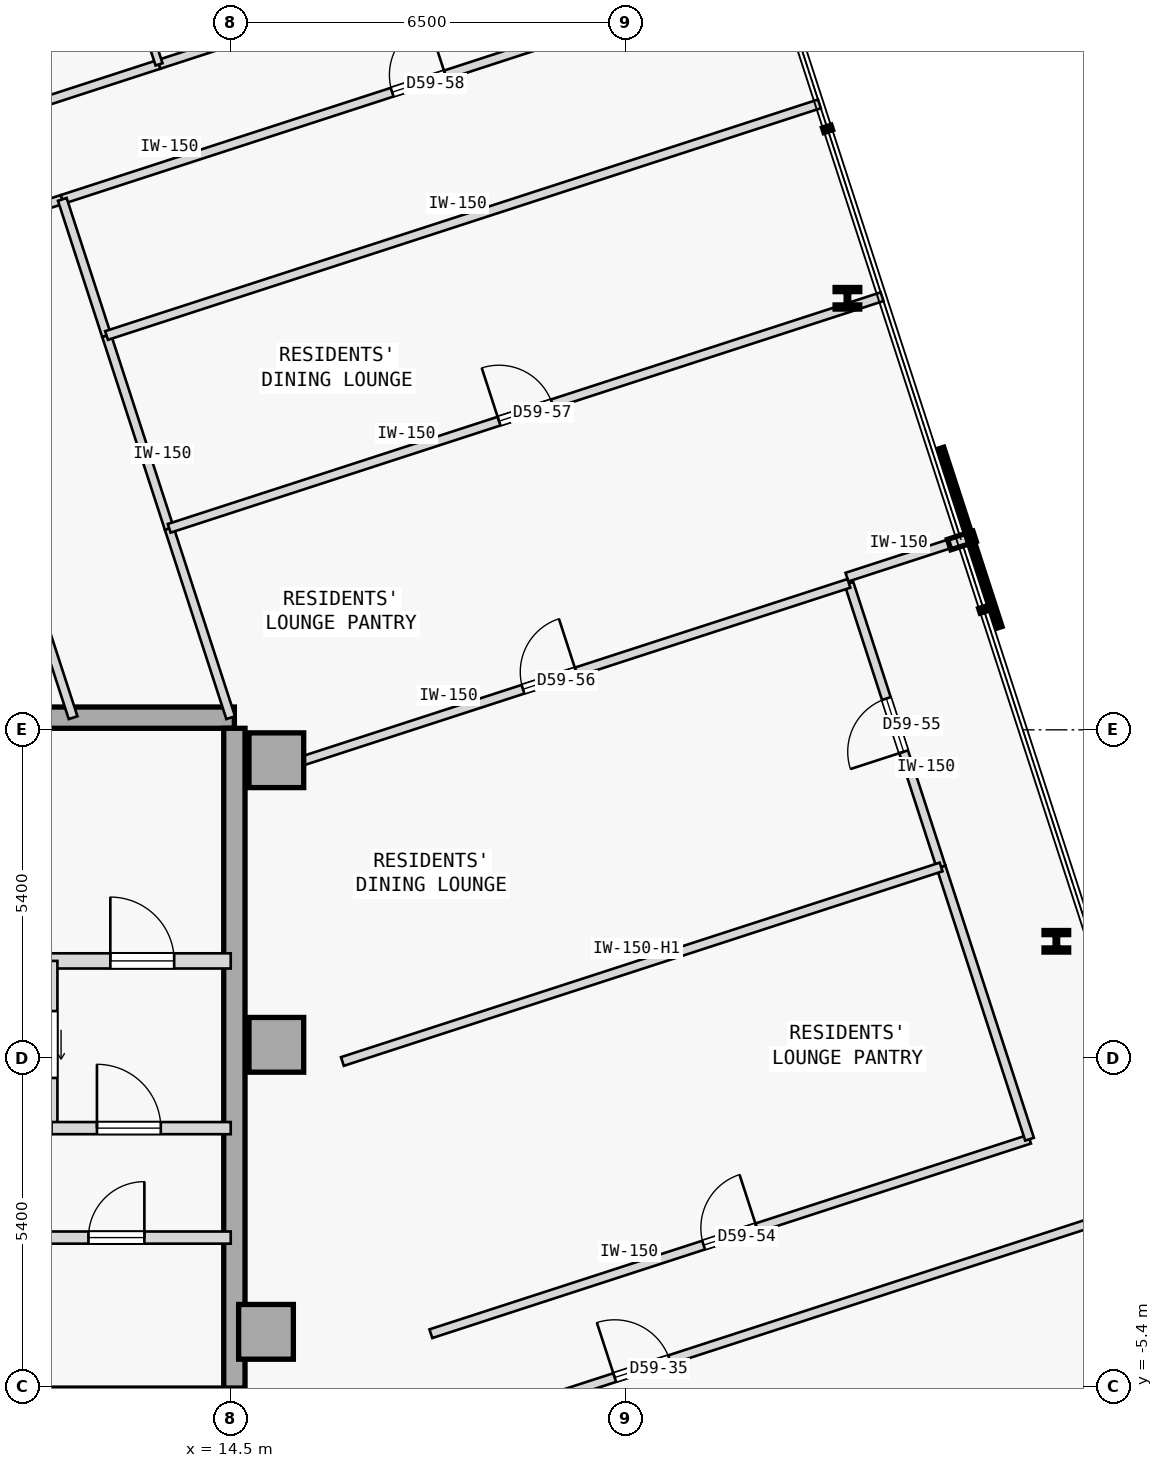
"""IFC4 building model, lengths in metres.
Left out: names, types, materials, properties, quantities, classifications, styles, units other than length and angle.
Written with IfcOpenShell. Run it as: python <this file> out.ifc"""

import sys

from ifc_helpers import new_model, si_unit, direction, frame, frame_2d, origin, origin_2d, place, context, subcontext, project, spatial, rectangle, i_section, extrude, element, fill, save


model = new_model("IFC4")
c1 = context("Model", 3, precision=1e-05, world=origin(), true_north=direction((0.0, 1.0)))
c2 = subcontext(c1, "Body", "Model", "MODEL_VIEW")
j1 = project(units=[si_unit("LENGTHUNIT", "METRE"), si_unit("PLANEANGLEUNIT", "RADIAN")], contexts=[c1])
p1 = place(None, origin())
s1 = spatial("IfcSite", under=j1, at=p1, CompositionType="ELEMENT")
p2 = place(p1, origin())
s2 = spatial("IfcBuilding", under=s1, at=p2, CompositionType="ELEMENT")
p3 = place(p2, frame((0.0, 0.0, 224.3)))
s3 = spatial("IfcBuildingStorey", under=s2, at=p3, CompositionType="ELEMENT", Elevation=224.3)
for number, where, z_axis, x_axis in (
    (1, (15.25, 4.9, 0.0), (0.0, 0.0, 1.0), (1.0, 0.0, 0.0)),
    (2, (15.25, 0.22, 0.0), (0.0, 0.0, 1.0), (1.0, 0.0, 0.0)),
    (3, (15.08, -4.5, 0.0), (0.0, 0.0, 1.0), (1.0, 0.0, 0.0)),
):
    element("IfcColumn", number, at=place(p3, frame(where, z_axis=z_axis, x_axis=x_axis)), inside=s3, PredefinedType="COLUMN", context=c2, shape_type="SweptSolid", body=[
        extrude(rectangle(XDim=0.9, YDim=0.9, at=origin_2d()), origin(), (0.0, 0.0, 1.0), 3.35),
    ])
p4 = place(p3, frame((3.15, 5.6, 0.0), z_axis=(0.0, 0.0, 1.0), x_axis=(1.0, 0.0, 0.0)))
e4 = element("IfcWall", 4, at=p4, inside=s3, PredefinedType="SHEAR", context=c2, shape_type="SweptSolid", body=[
    extrude(rectangle(XDim=11.41, YDim=0.35, at=frame_2d((5.705, 0.0))), origin(), (0.0, 0.0, 1.0), 3.125),
])
p5 = place(p3, frame((14.56, -5.425, 0.0), z_axis=(0.0, 0.0, 1.0), x_axis=(0.0, 1.0, 0.0)))
e5 = element("IfcWall", 5, at=p5, inside=s3, PredefinedType="SHEAR", context=c2, shape_type="SweptSolid", body=[
    extrude(rectangle(XDim=10.85, YDim=0.35, at=frame_2d((5.425, 0.0))), origin(), (0.0, 0.0, 1.0), 3.125),
])
for number, where, z_axis, x_axis in (
    (6, (28.078, 1.922, 0.0), (0.0, 0.0, 1.0), (1.0, 0.0, 0.0)),
    (7, (24.642, 12.497, 0.0), (0.0, 0.0, 1.0), (1.0, 0.0, 0.0)),
):
    element("IfcColumn", number, at=place(p3, frame(where, z_axis=z_axis, x_axis=x_axis)), inside=s3, PredefinedType="COLUMN", context=c2, shape_type="SweptSolid", body=[
        extrude(i_section(OverallWidth=0.405, OverallDepth=0.355, WebThickness=0.042, FlangeThickness=0.068, FilletRadius=0.015, at=origin_2d()), origin(), (0.0, 0.0, 1.0), 3.35),
    ])
p6 = place(p3, frame((10.9, 1.6, 0.0), z_axis=(0.0, 0.0, 1.0), x_axis=(1.0, 0.0, 0.0)))
e8 = element("IfcWall", 8, at=p6, inside=s3, PredefinedType="STANDARD", context=c2, shape_type="SweptSolid", body=[
    extrude(rectangle(XDim=3.6, YDim=0.25, at=frame_2d((1.8, 0.0))), origin(), (0.0, 0.0, 1.0), 3.125),
])
p7 = place(p6, frame((1.62, 0.0, 0.0)))
e9 = element("IfcOpeningElement", 9, at=p7, cuts=e8, PredefinedType="OPENING", context=c2, shape_type="SweptSolid", body=[
    extrude(rectangle(XDim=1.05, YDim=2.15, at=frame_2d((0.525, 1.075))), frame((0.0, 0.135, 0.0), z_axis=(0.0, -1.0, 0.0), x_axis=(1.0, 0.0, 0.0)), (0.0, 0.0, 1.0), 0.27),
])
p8 = place(p3, frame((11.55, -1.15, 0.0), z_axis=(0.0, 0.0, 1.0), x_axis=(0.0, 1.0, 0.0)))
e10 = element("IfcWall", 10, at=p8, inside=s3, PredefinedType="STANDARD", context=c2, shape_type="SweptSolid", body=[
    extrude(rectangle(XDim=2.75, YDim=0.2, at=frame_2d((1.375, 0.0))), origin(), (0.0, 0.0, 1.0), 3.125),
])
p9 = place(p8, frame((0.825, 0.0, 0.0)))
e11 = element("IfcOpeningElement", 11, at=p9, cuts=e10, PredefinedType="OPENING", context=c2, shape_type="SweptSolid", body=[
    extrude(rectangle(XDim=1.1, YDim=2.15, at=frame_2d((0.55, 1.075))), frame((0.0, 0.11, 0.0), z_axis=(0.0, -1.0, 0.0), x_axis=(1.0, 0.0, 0.0)), (0.0, 0.0, 1.0), 0.22),
])
p10 = place(p3, frame((11.55, -1.15, 0.0), z_axis=(0.0, 0.0, 1.0), x_axis=(1.0, 0.0, 0.0)))
e12 = element("IfcWall", 12, at=p10, inside=s3, PredefinedType="STANDARD", context=c2, shape_type="SweptSolid", body=[
    extrude(rectangle(XDim=2.95, YDim=0.2, at=frame_2d((1.475, 0.0))), origin(), (0.0, 0.0, 1.0), 3.125),
])
p11 = place(p10, frame((0.75, 0.0, 0.0)))
e13 = element("IfcOpeningElement", 13, at=p11, cuts=e12, PredefinedType="OPENING", context=c2, shape_type="SweptSolid", body=[
    extrude(rectangle(XDim=1.05, YDim=2.18, at=frame_2d((0.525, 1.09))), frame((0.0, 0.11, 0.0), z_axis=(0.0, -1.0, 0.0), x_axis=(1.0, 0.0, 0.0)), (0.0, 0.0, 1.0), 0.22),
])
p12 = place(p3, frame((3.7, -2.95, 0.0), z_axis=(0.0, 0.0, 1.0), x_axis=(1.0, 0.0, 0.0)))
e14 = element("IfcWall", 14, at=p12, inside=s3, PredefinedType="STANDARD", context=c2, shape_type="SweptSolid", body=[
    extrude(rectangle(XDim=10.8, YDim=0.2, at=frame_2d((5.4, 0.0))), origin(), (0.0, 0.0, 1.0), 3.125),
])
p13 = place(p12, frame((0.53, 0.0, 0.0)))
e15 = element("IfcOpeningElement", 15, at=p13, cuts=e14, PredefinedType="OPENING", context=c2, shape_type="SweptSolid", body=[
    extrude(rectangle(XDim=1.1, YDim=2.15, at=frame_2d((0.55, 1.075))), frame((0.0, 0.11, 0.0), z_axis=(0.0, -1.0, 0.0), x_axis=(1.0, 0.0, 0.0)), (0.0, 0.0, 1.0), 0.22),
])
p14 = place(p12, frame((4.14, 0.0, 0.0)))
e16 = element("IfcOpeningElement", 16, at=p14, cuts=e14, PredefinedType="OPENING", context=c2, shape_type="SweptSolid", body=[
    extrude(rectangle(XDim=0.92, YDim=2.15, at=frame_2d((0.46, 1.075))), frame((0.0, 0.11, 0.0), z_axis=(0.0, -1.0, 0.0), x_axis=(1.0, 0.0, 0.0)), (0.0, 0.0, 1.0), 0.22),
])
p15 = place(p12, frame((8.46, 0.0, 0.0)))
e17 = element("IfcOpeningElement", 17, at=p15, cuts=e14, PredefinedType="OPENING", context=c2, shape_type="SweptSolid", body=[
    extrude(rectangle(XDim=0.92, YDim=2.15, at=frame_2d((0.46, 1.075))), frame((0.0, 0.11, 0.0), z_axis=(0.0, -1.0, 0.0), x_axis=(1.0, 0.0, 0.0)), (0.0, 0.0, 1.0), 0.22),
])
p16 = place(p3, frame((11.086, 15.617, 0.0), z_axis=(0.0, 0.0, 1.0), x_axis=(0.951045519245, 0.309050837767, 0.0)))
e18 = element("IfcWall", 18, at=p16, inside=s3, PredefinedType="PARTITIONING", context=c2, shape_type="SweptSolid", body=[
    extrude(rectangle(XDim=2.35, YDim=0.15, at=frame_2d((1.175, 0.0))), origin(), (0.0, 0.0, 1.0), 3.125),
])
p17 = place(p3, frame((13.321, 16.344, 0.0), z_axis=(0.0, 0.0, 1.0), x_axis=(0.951052627573, 0.309028962374, 0.0)))
e19 = element("IfcWall", 19, at=p17, inside=s3, PredefinedType="PARTITIONING", context=c2, shape_type="SweptSolid", body=[
    extrude(rectangle(XDim=4.35, YDim=0.15, at=frame_2d((2.175, 0.0))), origin(), (0.0, 0.0, 1.0), 3.125),
])
p18 = place(p3, frame((12.517, -7.948, 0.0), z_axis=(0.0, 0.0, 1.0), x_axis=(0.951053764264, 0.309025464128, 0.0)))
e20 = element("IfcWall", 20, at=p18, inside=s3, PredefinedType="PARTITIONING", context=c2, shape_type="SweptSolid", body=[
    extrude(rectangle(XDim=18.399, YDim=0.15, at=frame_2d((9.2, 0.0))), origin(), (0.0, 0.0, 1.0), 3.125),
])
p19 = place(p18, frame((8.725, 0.0, 0.0)))
e21 = element("IfcOpeningElement", 21, at=p19, cuts=e20, PredefinedType="OPENING", context=c2, shape_type="SweptSolid", body=[
    extrude(rectangle(XDim=0.95, YDim=2.15, at=frame_2d((0.475, 1.075))), frame((0.0, 0.085, 0.0), z_axis=(0.0, -1.0, 0.0), x_axis=(1.0, 0.0, 0.0)), (0.0, 0.0, 1.0), 0.17),
])
p20 = place(p3, frame((9.386, 13.362, 0.0), z_axis=(0.0, 0.0, 1.0), x_axis=(0.951052991774, 0.309027841526, 0.0)))
e22 = element("IfcWall", 22, at=p20, inside=s3, PredefinedType="PARTITIONING", context=c2, shape_type="SweptSolid", body=[
    extrude(rectangle(XDim=2.465, YDim=0.15, at=frame_2d((1.232, 0.0))), origin(), (0.0, 0.0, 1.0), 3.125),
])
p21 = place(p20, frame((0.772, 0.0, 0.0)))
e23 = element("IfcOpeningElement", 23, at=p21, cuts=e22, PredefinedType="OPENING", context=c2, shape_type="SweptSolid", body=[
    extrude(rectangle(XDim=0.92, YDim=2.15, at=frame_2d((0.46, 1.075))), frame((0.0, 0.085, 0.0), z_axis=(0.0, -1.0, 0.0), x_axis=(1.0, 0.0, 0.0)), (0.0, 0.0, 1.0), 0.17),
])
p22 = place(p3, frame((17.791, -4.531, 0.0), z_axis=(0.0, 0.0, 1.0), x_axis=(0.951056769902, 0.309016213852, 0.0)))
e24 = element("IfcWall", 24, at=p22, inside=s3, PredefinedType="PARTITIONING", context=c2, shape_type="SweptSolid", body=[
    extrude(rectangle(XDim=10.352, YDim=0.15, at=frame_2d((5.176, 0.0))), origin(), (0.0, 0.0, 1.0), 3.125),
])
p23 = place(p22, frame((4.716, 0.0, 0.0)))
e25 = element("IfcOpeningElement", 25, at=p23, cuts=e24, PredefinedType="OPENING", context=c2, shape_type="SweptSolid", body=[
    extrude(rectangle(XDim=0.92, YDim=2.15, at=frame_2d((0.46, 1.075))), frame((0.0, 0.085, 0.0), z_axis=(0.0, -1.0, 0.0), x_axis=(1.0, 0.0, 0.0)), (0.0, 0.0, 1.0), 0.17),
])
p24 = place(p3, frame((27.637, -1.332, 0.0), z_axis=(0.0, 0.0, 1.0), x_axis=(-0.309029776355, 0.951052363083, 0.0)))
e26 = element("IfcWall", 26, at=p24, inside=s3, PredefinedType="PARTITIONING", context=c2, shape_type="SweptSolid", body=[
    extrude(rectangle(XDim=4.707, YDim=0.15, at=frame_2d((2.354, 0.0))), origin(), (0.0, 0.0, 1.0), 3.125),
])
p25 = place(p3, frame((26.182, 3.145, 0.0), z_axis=(0.0, 0.0, 1.0), x_axis=(-0.309019653166, 0.951055652397, 0.0)))
e27 = element("IfcWall", 27, at=p25, inside=s3, PredefinedType="PARTITIONING", context=c2, shape_type="SweptSolid", body=[
    extrude(rectangle(XDim=4.904, YDim=0.15, at=frame_2d((2.452, 0.0))), origin(), (0.0, 0.0, 1.0), 3.125),
])
p26 = place(p25, frame((1.992, 0.0, 0.0)))
e28 = element("IfcOpeningElement", 28, at=p26, cuts=e27, PredefinedType="OPENING", context=c2, shape_type="SweptSolid", body=[
    extrude(rectangle(XDim=0.92, YDim=2.15, at=frame_2d((0.46, 1.075))), frame((0.0, 0.085, 0.0), z_axis=(0.0, -1.0, 0.0), x_axis=(1.0, 0.0, 0.0)), (0.0, 0.0, 1.0), 0.17),
])
p27 = place(p3, frame((24.634, 7.91, 0.0), z_axis=(0.0, 0.0, 1.0), x_axis=(0.951054051148, 0.309024581215, 0.0)))
e29 = element("IfcWall", 29, at=p27, inside=s3, PredefinedType="PARTITIONING", context=c2, shape_type="SweptSolid", body=[
    extrude(rectangle(XDim=1.975, YDim=0.15, at=frame_2d((0.988, 0.0))), origin(), (0.0, 0.0, 1.0), 3.125),
])
p28 = place(p3, frame((11.73, 14.123, 0.0), z_axis=(0.0, 0.0, 1.0), x_axis=(0.951060263663, 0.309005460926, 0.0)))
e30 = element("IfcWall", 30, at=p28, inside=s3, PredefinedType="PARTITIONING", context=c2, shape_type="SweptSolid", body=[
    extrude(rectangle(XDim=12.327, YDim=0.15, at=frame_2d((6.164, 0.0))), origin(), (0.0, 0.0, 1.0), 3.125),
])
p29 = place(p28, frame((5.704, 0.0, 0.0)))
e31 = element("IfcOpeningElement", 31, at=p29, cuts=e30, PredefinedType="OPENING", context=c2, shape_type="SweptSolid", body=[
    extrude(rectangle(XDim=0.92, YDim=2.15, at=frame_2d((0.46, 1.075))), frame((0.0, 0.085, 0.0), z_axis=(0.0, -1.0, 0.0), x_axis=(1.0, 0.0, 0.0)), (0.0, 0.0, 1.0), 0.17),
])
p30 = place(p3, frame((13.321, 16.344, 0.0), z_axis=(0.0, 0.0, 1.0), x_axis=(-0.309058537449, 0.951043017129, 0.0)))
e32 = element("IfcWall", 32, at=p30, inside=s3, PredefinedType="PARTITIONING", context=c2, shape_type="SweptSolid", body=[
    extrude(rectangle(XDim=2.005, YDim=0.12, at=frame_2d((1.002, 0.0))), origin(), (0.0, 0.0, 1.0), 3.125),
])
p31 = place(p3, frame((11.908, 5.6, 0.0), z_axis=(0.0, 0.0, 1.0), x_axis=(-0.308994076163, 0.951063962568, 0.0)))
e33 = element("IfcWall", 33, at=p31, inside=s3, PredefinedType="PARTITIONING", context=c2, shape_type="SweptSolid", body=[
    extrude(rectangle(XDim=8.161, YDim=0.15, at=frame_2d((4.081, 0.0))), origin(), (0.0, 0.0, 1.0), 3.125),
])
p32 = place(p3, frame((14.5, 5.6, 0.0), z_axis=(0.0, 0.0, 1.0), x_axis=(-0.309015253813, 0.951057081836, 0.0)))
e34 = element("IfcWall", 34, at=p32, inside=s3, PredefinedType="PARTITIONING", context=c2, shape_type="SweptSolid", body=[
    extrude(rectangle(XDim=3.274, YDim=0.15, at=frame_2d((1.637, 0.0))), origin(), (0.0, 0.0, 1.0), 3.125),
])
p33 = place(p3, frame((13.488, 8.714, 0.0), z_axis=(0.0, 0.0, 1.0), x_axis=(-0.308946982245, 0.951079261766, 0.0)))
e35 = element("IfcWall", 35, at=p33, inside=s3, PredefinedType="PARTITIONING", context=c2, shape_type="SweptSolid", body=[
    extrude(rectangle(XDim=3.334, YDim=0.15, at=frame_2d((1.667, 0.0))), origin(), (0.0, 0.0, 1.0), 3.125),
])
p34 = place(p3, frame((12.458, 11.885, 0.0), z_axis=(0.0, 0.0, 1.0), x_axis=(-0.309062621189, 0.951041690035, 0.0)))
e36 = element("IfcWall", 36, at=p34, inside=s3, PredefinedType="PARTITIONING", context=c2, shape_type="SweptSolid", body=[
    extrude(rectangle(XDim=2.354, YDim=0.15, at=frame_2d((1.177, 0.0))), origin(), (0.0, 0.0, 1.0), 3.125),
])
p35 = place(p3, frame((16.337, -0.054, 0.0), z_axis=(0.0, 0.0, 1.0), x_axis=(0.951056769902, 0.309016213852, 0.0)))
e37 = element("IfcWall", 37, at=p35, inside=s3, PredefinedType="PARTITIONING", context=c2, shape_type="SweptSolid", body=[
    extrude(rectangle(XDim=10.352, YDim=0.15, at=frame_2d((5.176, 0.0))), origin(), (0.0, 0.0, 1.0), 2.675),
])
p36 = place(p3, frame((14.821, 4.61, 0.0), z_axis=(0.0, 0.0, 1.0), x_axis=(0.951063700751, 0.30899488202, 0.0)))
e38 = element("IfcWall", 38, at=p36, inside=s3, PredefinedType="PARTITIONING", context=c2, shape_type="SweptSolid", body=[
    extrude(rectangle(XDim=10.352, YDim=0.15, at=frame_2d((5.176, 0.0))), origin(), (0.0, 0.0, 1.0), 3.125),
])
p37 = place(p36, frame((4.716, 0.0, 0.0)))
e39 = element("IfcOpeningElement", 39, at=p37, cuts=e38, PredefinedType="OPENING", context=c2, shape_type="SweptSolid", body=[
    extrude(rectangle(XDim=0.92, YDim=2.15, at=frame_2d((0.46, 1.075))), frame((0.0, 0.085, 0.0), z_axis=(0.0, -1.0, 0.0), x_axis=(1.0, 0.0, 0.0)), (0.0, 0.0, 1.0), 0.17),
])
p38 = place(p3, frame((13.488, 8.714, 0.0), z_axis=(0.0, 0.0, 1.0), x_axis=(0.951062154725, 0.308999640533, 0.0)))
e40 = element("IfcWall", 40, at=p38, inside=s3, PredefinedType="PARTITIONING", context=c2, shape_type="SweptSolid", body=[
    extrude(rectangle(XDim=12.327, YDim=0.15, at=frame_2d((6.164, 0.0))), origin(), (0.0, 0.0, 1.0), 3.125),
])
p39 = place(p38, frame((5.704, 0.0, 0.0)))
e41 = element("IfcOpeningElement", 41, at=p39, cuts=e40, PredefinedType="OPENING", context=c2, shape_type="SweptSolid", body=[
    extrude(rectangle(XDim=0.92, YDim=2.15, at=frame_2d((0.46, 1.075))), frame((0.0, 0.085, 0.0), z_axis=(0.0, -1.0, 0.0), x_axis=(1.0, 0.0, 0.0)), (0.0, 0.0, 1.0), 0.17),
])
p40 = place(p3, frame((12.458, 11.885, 0.0), z_axis=(0.0, 0.0, 1.0), x_axis=(0.951060263663, 0.309005460926, 0.0)))
e42 = element("IfcWall", 42, at=p40, inside=s3, PredefinedType="PARTITIONING", context=c2, shape_type="SweptSolid", body=[
    extrude(rectangle(XDim=12.327, YDim=0.15, at=frame_2d((6.164, 0.0))), origin(), (0.0, 0.0, 1.0), 3.125),
])
p41 = place(p7, origin())
e43 = element("IfcDoor", 43, at=p41, inside=s3, OperationType="SINGLE_SWING_LEFT", PredefinedType="DOOR", context=c2, shape_type="SweptSolid", body=[
    extrude(rectangle(XDim=1.05, YDim=2.15, at=frame_2d((0.525, 1.075))), frame((0.0, 0.025, 0.0), z_axis=(0.0, -1.0, 0.0), x_axis=(1.0, 0.0, 0.0)), (0.0, 0.0, 1.0), 0.05),
])
fill(e9, e43)
p42 = place(p11, origin())
e44 = element("IfcDoor", 44, at=p42, inside=s3, OperationType="SINGLE_SWING_LEFT", PredefinedType="DOOR", context=c2, shape_type="SweptSolid", body=[
    extrude(rectangle(XDim=1.05, YDim=2.18, at=frame_2d((0.525, 1.09))), frame((0.0, 0.025, 0.0), z_axis=(0.0, -1.0, 0.0), x_axis=(1.0, 0.0, 0.0)), (0.0, 0.0, 1.0), 0.05),
])
fill(e13, e44)
p43 = place(p9, origin())
e45 = element("IfcDoor", 45, at=p43, inside=s3, OperationType="SLIDING_TO_RIGHT", PredefinedType="DOOR", context=c2, shape_type="SweptSolid", body=[
    extrude(rectangle(XDim=1.1, YDim=2.15, at=frame_2d((0.55, 1.075))), frame((0.0, 0.025, 0.0), z_axis=(0.0, -1.0, 0.0), x_axis=(1.0, 0.0, 0.0)), (0.0, 0.0, 1.0), 0.05),
])
fill(e11, e45)
p44 = place(p15, origin())
e46 = element("IfcDoor", 46, at=p44, inside=s3, OperationType="SINGLE_SWING_RIGHT", PredefinedType="DOOR", context=c2, shape_type="SweptSolid", body=[
    extrude(rectangle(XDim=0.92, YDim=2.15, at=frame_2d((0.46, 1.075))), frame((0.0, 0.025, 0.0), z_axis=(0.0, -1.0, 0.0), x_axis=(1.0, 0.0, 0.0)), (0.0, 0.0, 1.0), 0.05),
])
fill(e17, e46)
p45 = place(p19, origin())
e47 = element("IfcDoor", 47, at=p45, inside=s3, OperationType="SINGLE_SWING_LEFT", PredefinedType="DOOR", context=c2, shape_type="SweptSolid", body=[
    extrude(rectangle(XDim=0.95, YDim=2.15, at=frame_2d((0.475, 1.075))), frame((0.0, 0.025, 0.0), z_axis=(0.0, -1.0, 0.0), x_axis=(1.0, 0.0, 0.0)), (0.0, 0.0, 1.0), 0.05),
])
fill(e21, e47)
p46 = place(p23, origin())
e48 = element("IfcDoor", 48, at=p46, inside=s3, OperationType="SINGLE_SWING_RIGHT", PredefinedType="DOOR", context=c2, shape_type="SweptSolid", body=[
    extrude(rectangle(XDim=0.92, YDim=2.15, at=frame_2d((0.46, 1.075))), frame((0.0, 0.025, 0.0), z_axis=(0.0, -1.0, 0.0), x_axis=(1.0, 0.0, 0.0)), (0.0, 0.0, 1.0), 0.05),
])
fill(e25, e48)
p47 = place(p26, origin())
e49 = element("IfcDoor", 49, at=p47, inside=s3, OperationType="SINGLE_SWING_LEFT", PredefinedType="DOOR", context=c2, shape_type="SweptSolid", body=[
    extrude(rectangle(XDim=0.92, YDim=2.15, at=frame_2d((0.46, 1.075))), frame((0.0, 0.025, 0.0), z_axis=(0.0, -1.0, 0.0), x_axis=(1.0, 0.0, 0.0)), (0.0, 0.0, 1.0), 0.05),
])
fill(e28, e49)
p48 = place(p37, origin())
e50 = element("IfcDoor", 50, at=p48, inside=s3, OperationType="SINGLE_SWING_RIGHT", PredefinedType="DOOR", context=c2, shape_type="SweptSolid", body=[
    extrude(rectangle(XDim=0.92, YDim=2.15, at=frame_2d((0.46, 1.075))), frame((0.0, 0.025, 0.0), z_axis=(0.0, -1.0, 0.0), x_axis=(1.0, 0.0, 0.0)), (0.0, 0.0, 1.0), 0.05),
])
fill(e39, e50)
p49 = place(p39, origin())
e51 = element("IfcDoor", 51, at=p49, inside=s3, OperationType="SINGLE_SWING_LEFT", PredefinedType="DOOR", context=c2, shape_type="SweptSolid", body=[
    extrude(rectangle(XDim=0.92, YDim=2.15, at=frame_2d((0.46, 1.075))), frame((0.0, 0.025, 0.0), z_axis=(0.0, -1.0, 0.0), x_axis=(1.0, 0.0, 0.0)), (0.0, 0.0, 1.0), 0.05),
])
fill(e41, e51)
p50 = place(p29, origin())
e52 = element("IfcDoor", 52, at=p50, inside=s3, OperationType="SINGLE_SWING_RIGHT", PredefinedType="DOOR", context=c2, shape_type="SweptSolid", body=[
    extrude(rectangle(XDim=0.92, YDim=2.15, at=frame_2d((0.46, 1.075))), frame((0.0, 0.025, 0.0), z_axis=(0.0, -1.0, 0.0), x_axis=(1.0, 0.0, 0.0)), (0.0, 0.0, 1.0), 0.05),
])
fill(e31, e52)
save(model, sys.argv[1])
